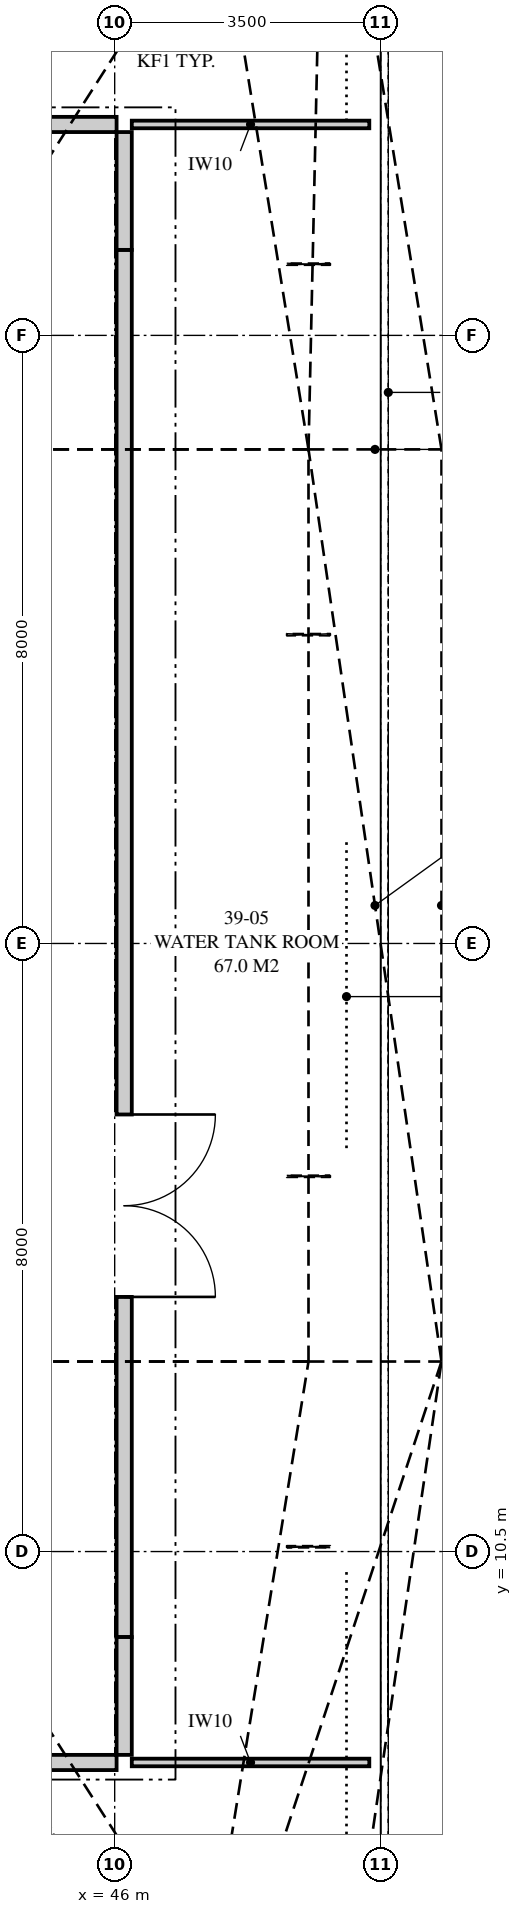
"""IFC4 building model, lengths in metres.
Left out: names, types, materials, properties, quantities, classifications, styles, units other than length and angle.
Written with IfcOpenShell. Run it as: python <this file> out.ifc"""

import sys

from ifc_helpers import new_model, si_unit, direction, frame, frame_2d, origin, place, context, subcontext, project, spatial, polyline, rectangle, outline, extrude, element, fill, save


model = new_model("IFC4")
c1 = context("Model", 3, precision=1e-05, world=origin(), true_north=direction((0.0, 1.0)))
c2 = subcontext(c1, "Body", "Model", "MODEL_VIEW")
j1 = project(units=[si_unit("LENGTHUNIT", "METRE"), si_unit("PLANEANGLEUNIT", "RADIAN")], contexts=[c1])
p1 = place(None, origin())
s1 = spatial("IfcSite", under=j1, at=p1, CompositionType="ELEMENT")
p2 = place(p1, origin())
s2 = spatial("IfcBuilding", under=s1, at=p2, CompositionType="ELEMENT")
p3 = place(p2, frame((0.0, 0.0, 144.35)))
s3 = spatial("IfcBuildingStorey", under=s2, at=p3, CompositionType="ELEMENT", Elevation=144.35)
p4 = place(p3, frame((17.775, 7.725, 0.0), z_axis=(0.0, 0.0, 1.0), x_axis=(1.0, 0.0, 0.0)))
e1 = element("IfcWall", 1, at=p4, inside=s3, PredefinedType="PARTITIONING", context=c2, shape_type="SweptSolid", body=[
    extrude(outline(polyline([(28.25, 0.0), (28.25, 4.72), (27.983, 4.72), (27.983, 4.141), (27.295, 4.141), (27.295, 4.72), (25.672, 4.72), (25.672, 4.141), (24.748, 4.141), (24.748, 4.72), (20.146, 4.72), (20.146, 4.141), (19.233, 4.141), (19.233, 4.72), (16.72, 4.72), (16.72, 4.141), (15.864, 4.141), (15.864, 4.72), (12.635, 4.72), (12.635, 4.208), (12.065, 4.208), (12.065, 4.72), (8.798, 4.72), (8.798, 4.141), (7.945, 4.141), (7.945, 4.72), (5.432, 4.72), (5.432, 4.141), (4.516, 4.141), (4.516, 4.72), (0.0, 4.72), (0.0, 0.0), (26.463, 0.0), (26.463, 2.2), (27.621, 2.2), (27.621, 0.0), (28.25, 0.0)]), holes=[polyline([(11.405, 3.239), (11.459, 3.353), (12.006, 3.423), (12.006, 2.917), (11.951, 2.803), (11.405, 2.732), (11.405, 3.239)])]), frame((0.0, 0.1, 0.0), z_axis=(0.0, -1.0, 0.0), x_axis=(1.0, 0.0, 0.0)), (0.0, 0.0, 1.0), 0.2),
])
p5 = place(p4, frame((0.85, 0.0, 0.0)))
e2 = element("IfcOpeningElement", 2, at=p5, cuts=e1, PredefinedType="OPENING", context=c2, shape_type="SweptSolid", body=[
    extrude(rectangle(XDim=1.0, YDim=2.1, at=frame_2d((0.5, 1.05))), frame((0.0, 0.11, 0.0), z_axis=(0.0, -1.0, 0.0), x_axis=(1.0, 0.0, 0.0)), (0.0, 0.0, 1.0), 0.22),
])
p6 = place(p4, frame((25.25, 0.0, 0.0)))
e3 = element("IfcOpeningElement", 3, at=p6, cuts=e1, PredefinedType="OPENING", context=c2, shape_type="SweptSolid", body=[
    extrude(rectangle(XDim=1.0, YDim=2.1, at=frame_2d((0.5, 1.05))), frame((0.0, 0.11, 0.0), z_axis=(0.0, -1.0, 0.0), x_axis=(1.0, 0.0, 0.0)), (0.0, 0.0, 1.0), 0.22),
])
p7 = place(p3, frame((46.125, 7.825, 0.0), z_axis=(0.0, 0.0, 1.0), x_axis=(0.0, 1.0, 0.0)))
e4 = element("IfcWall", 4, at=p7, inside=s3, PredefinedType="PARTITIONING", context=c2, shape_type="SweptSolid", body=[
    extrude(rectangle(XDim=1.55, YDim=0.2, at=frame_2d((0.775, 0.0))), origin(), (0.0, 0.0, 1.0), 4.72),
])
p8 = place(p3, frame((17.775, 29.275, 0.0), z_axis=(0.0, 0.0, 1.0), x_axis=(1.0, 0.0, 0.0)))
e5 = element("IfcWall", 5, at=p8, inside=s3, PredefinedType="PARTITIONING", context=c2, shape_type="SweptSolid", body=[
    extrude(outline(polyline([(28.25, 0.0), (28.25, 4.72), (27.983, 4.72), (27.983, 4.141), (27.295, 4.141), (27.295, 4.72), (25.672, 4.72), (25.672, 4.141), (24.748, 4.141), (24.748, 4.72), (20.146, 4.72), (20.146, 4.141), (19.233, 4.141), (19.233, 4.72), (16.72, 4.72), (16.72, 4.141), (15.864, 4.141), (15.864, 4.72), (12.635, 4.72), (12.635, 4.208), (12.065, 4.208), (12.065, 4.72), (8.798, 4.72), (8.798, 4.141), (7.945, 4.141), (7.945, 4.72), (5.432, 4.72), (5.432, 4.141), (4.516, 4.141), (4.516, 4.72), (0.0, 4.72), (0.0, 0.0), (26.358, 0.0), (26.358, 2.2), (27.49, 2.2), (27.49, 0.0), (28.25, 0.0)]), holes=[polyline([(11.471, 3.377), (11.521, 3.481), (12.064, 3.539), (12.064, 3.042), (12.015, 2.938), (11.471, 2.88), (11.471, 3.377)])]), frame((0.0, 0.1, 0.0), z_axis=(0.0, -1.0, 0.0), x_axis=(1.0, 0.0, 0.0)), (0.0, 0.0, 1.0), 0.2),
])
p9 = place(p8, frame((13.225, 0.0, 0.0)))
e6 = element("IfcOpeningElement", 6, at=p9, cuts=e5, PredefinedType="OPENING", context=c2, shape_type="SweptSolid", body=[
    extrude(rectangle(XDim=2.4, YDim=2.4, at=frame_2d((1.2, 1.2))), frame((0.0, 0.11, 0.0), z_axis=(0.0, -1.0, 0.0), x_axis=(1.0, 0.0, 0.0)), (0.0, 0.0, 1.0), 0.22),
])
p10 = place(p3, frame((46.125, 27.625, 0.0), z_axis=(0.0, 0.0, 1.0), x_axis=(0.0, 1.0, 0.0)))
e7 = element("IfcWall", 7, at=p10, inside=s3, PredefinedType="PARTITIONING", context=c2, shape_type="SweptSolid", body=[
    extrude(rectangle(XDim=1.55, YDim=0.2, at=frame_2d((0.775, 0.0))), origin(), (0.0, 0.0, 1.0), 4.72),
])
p11 = place(p3, frame((46.125, 9.375, 0.0), z_axis=(0.0, 0.0, 1.0), x_axis=(0.0, 1.0, 0.0)))
e8 = element("IfcWall", 8, at=p11, inside=s3, PredefinedType="PARTITIONING", context=c2, shape_type="SweptSolid", body=[
    extrude(outline(polyline([(18.25, 0.0), (18.25, 4.72), (15.975, 4.72), (15.975, 4.02), (15.275, 4.02), (15.275, 4.72), (3.975, 4.72), (3.975, 4.02), (3.275, 4.02), (3.275, 4.72), (0.0, 4.72), (0.0, 0.0), (18.25, 0.0)]), holes=[polyline([(3.396, 1.435), (3.396, 2.41), (3.854, 2.41), (3.854, 1.435), (3.396, 1.435)]), polyline([(15.396, 1.435), (15.396, 2.41), (15.854, 2.41), (15.854, 1.435), (15.396, 1.435)])]), frame((0.0, 0.1, 0.0), z_axis=(0.0, -1.0, 0.0), x_axis=(1.0, 0.0, 0.0)), (0.0, 0.0, 1.0), 0.2),
])
p12 = place(p11, frame((4.475, 0.0, 0.0)))
e9 = element("IfcOpeningElement", 9, at=p12, cuts=e8, PredefinedType="OPENING", context=c2, shape_type="SweptSolid", body=[
    extrude(rectangle(XDim=2.4, YDim=2.4, at=frame_2d((1.2, 1.2))), frame((0.0, 0.11, 0.0), z_axis=(0.0, -1.0, 0.0), x_axis=(1.0, 0.0, 0.0)), (0.0, 0.0, 1.0), 0.22),
])
p13 = place(p3, frame((46.225, 7.725, 0.0), z_axis=(0.0, 0.0, 1.0), x_axis=(1.0, 0.0, 0.0)))
e10 = element("IfcWall", 10, at=p13, inside=s3, PredefinedType="PARTITIONING", context=c2, shape_type="SweptSolid", body=[
    extrude(outline(polyline([(0.0, 0.0), (3.125, 0.0), (3.125, 3.32), (2.587, 3.32), (2.587, 4.72), (0.0, 4.72), (0.0, 0.0)]), holes=[polyline([(2.95, 0.874), (1.671, 0.69), (1.671, 2.024), (1.708, 2.079), (2.988, 2.263), (2.988, 0.928), (2.95, 0.874)])]), frame((0.0, 0.05, 0.0), z_axis=(0.0, -1.0, 0.0), x_axis=(1.0, 0.0, 0.0)), (0.0, 0.0, 1.0), 0.1),
])
p14 = place(p3, frame((46.225, 29.275, 0.0), z_axis=(0.0, 0.0, 1.0), x_axis=(1.0, 0.0, 0.0)))
e11 = element("IfcWall", 11, at=p14, inside=s3, PredefinedType="PARTITIONING", context=c2, shape_type="SweptSolid", body=[
    extrude(outline(polyline([(0.0, 0.0), (3.125, 0.0), (3.125, 0.546), (1.808, 0.546), (1.808, 1.912), (1.811, 1.975), (3.031, 1.989), (3.125, 1.989), (3.125, 3.32), (2.666, 3.32), (2.666, 4.72), (0.0, 4.72), (0.0, 0.0)])), frame((0.0, 0.05, 0.0), z_axis=(0.0, -1.0, 0.0), x_axis=(1.0, 0.0, 0.0)), (0.0, 0.0, 1.0), 0.1),
])
p15 = place(p12, frame((2.4, 0.0, 0.0), z_axis=(0.0, 0.0, 1.0), x_axis=(-1.0, 0.0, 0.0)))
e12 = element("IfcDoor", 12, at=p15, inside=s3, OperationType="DOUBLE_DOOR_SINGLE_SWING", PredefinedType="DOOR", context=c2, shape_type="SweptSolid", body=[
    extrude(rectangle(XDim=2.4, YDim=2.4, at=frame_2d((1.2, 1.2))), frame((0.0, 0.025, 0.0), z_axis=(0.0, -1.0, 0.0), x_axis=(1.0, 0.0, 0.0)), (0.0, 0.0, 1.0), 0.05),
])
fill(e9, e12)
save(model, sys.argv[1])
